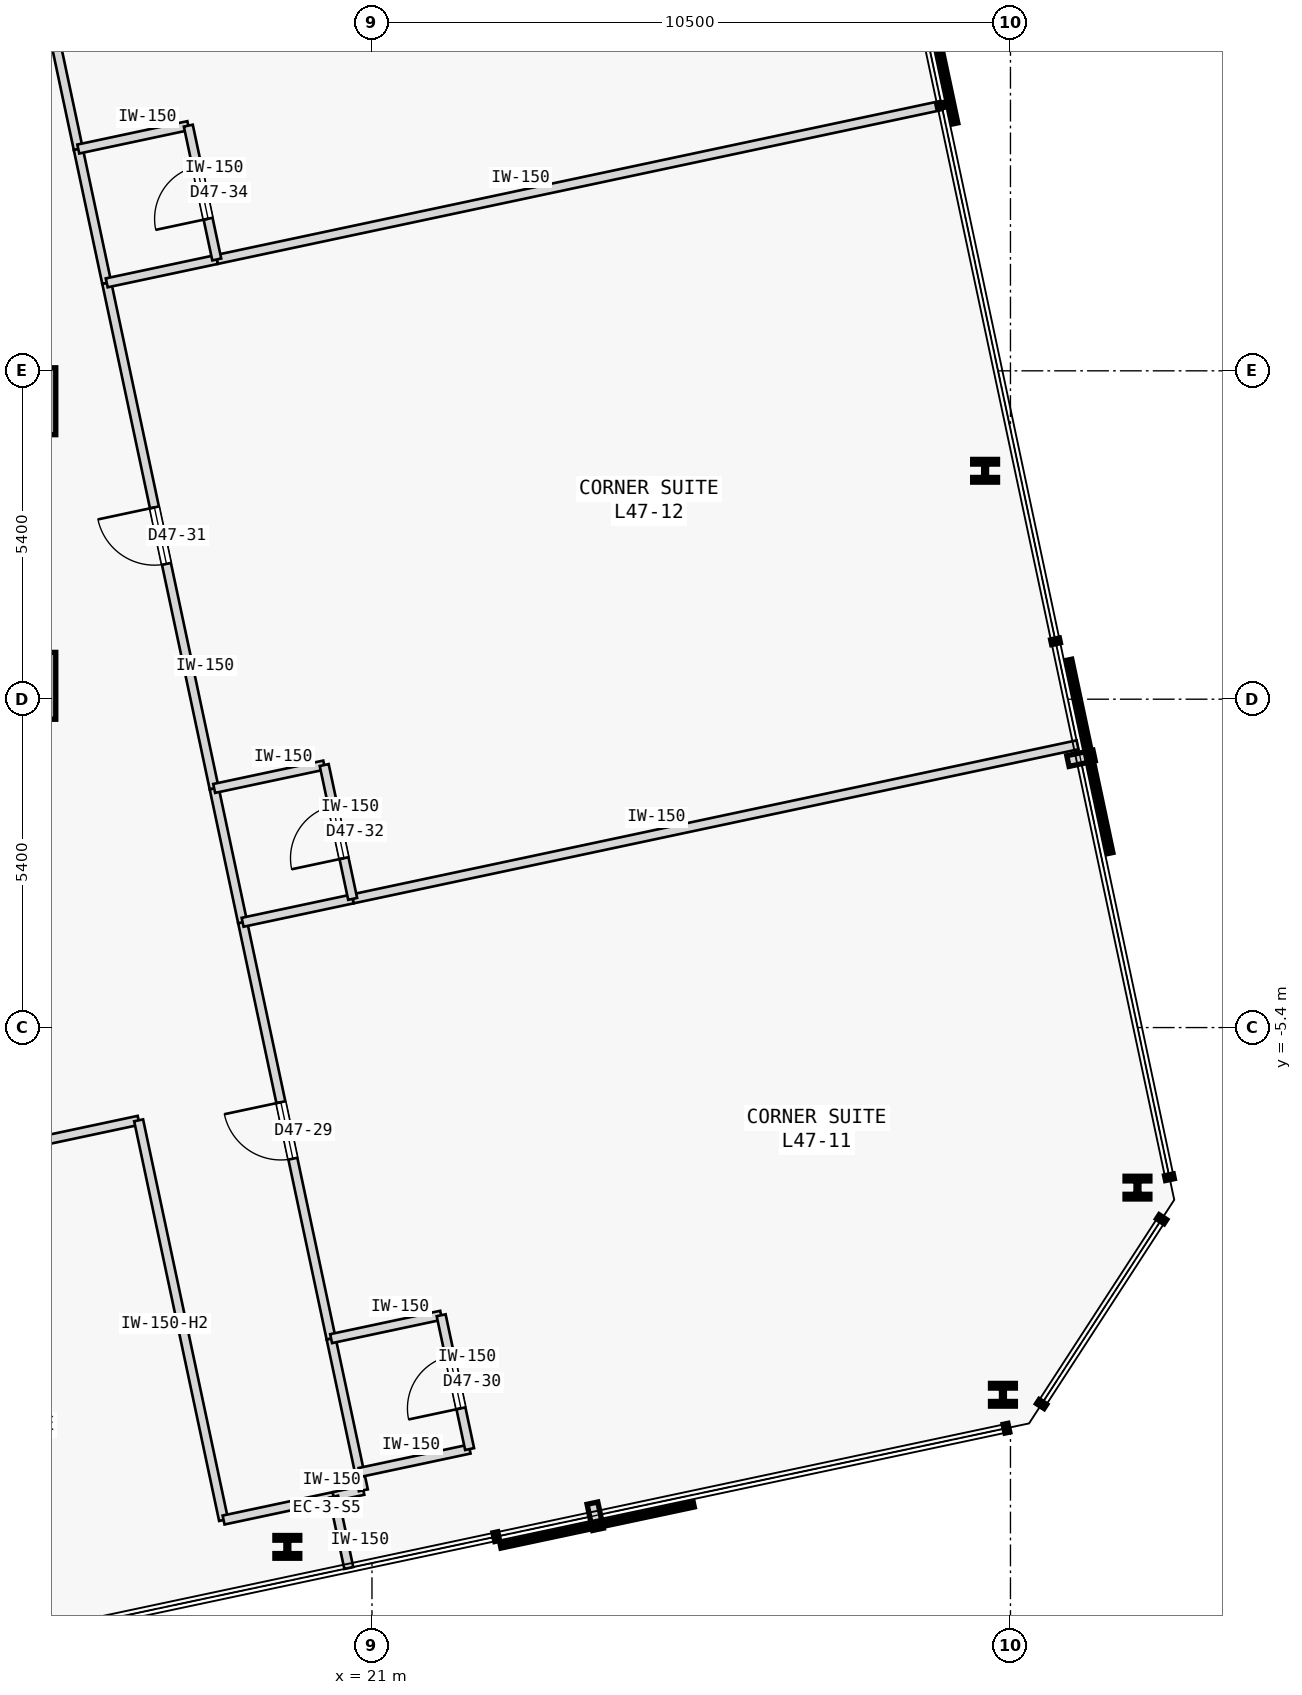
"""IFC4 building model, lengths in metres.
Left out: names, types, materials, properties, quantities, classifications, styles, units other than length and angle.
Written with IfcOpenShell. Run it as: python <this file> out.ifc"""

import sys

from ifc_helpers import new_model, si_unit, direction, frame, frame_2d, origin, origin_2d, place, context, subcontext, project, spatial, rectangle, i_section, extrude, element, fill, save


model = new_model("IFC4")
c1 = context("Model", 3, precision=1e-05, world=origin(), true_north=direction((0.0, 1.0)))
c2 = subcontext(c1, "Body", "Model", "MODEL_VIEW")
j1 = project(units=[si_unit("LENGTHUNIT", "METRE"), si_unit("PLANEANGLEUNIT", "RADIAN")], contexts=[c1])
p1 = place(None, origin())
s1 = spatial("IfcSite", under=j1, at=p1, CompositionType="ELEMENT")
p2 = place(p1, origin())
s2 = spatial("IfcBuilding", under=s1, at=p2, CompositionType="ELEMENT")
p3 = place(p2, frame((0.0, 0.0, 182.0)))
s3 = spatial("IfcBuildingStorey", under=s2, at=p3, CompositionType="ELEMENT", Elevation=182.0)
for number, where, z_axis, x_axis in (
    (1, (15.25, 4.9, 0.0), (0.0, 0.0, 1.0), (1.0, 0.0, 0.0)),
    (2, (15.25, 0.22, 0.0), (0.0, 0.0, 1.0), (1.0, 0.0, 0.0)),
):
    element("IfcColumn", number, at=place(p3, frame(where, z_axis=z_axis, x_axis=x_axis)), inside=s3, PredefinedType="COLUMN", context=c2, shape_type="SweptSolid", body=[
        extrude(rectangle(XDim=1.1, YDim=1.1, at=origin_2d()), origin(), (0.0, 0.0, 1.0), 3.4),
    ])
for number, where, z_axis, x_axis in (
    (3, (19.608, -13.94, 0.0), (0.0, 0.0, 1.0), (1.0, 0.0, 0.0)),
    (4, (31.376, -11.439, 0.0), (0.0, 0.0, 1.0), (1.0, 0.0, 0.0)),
    (5, (33.589, -8.032, 0.0), (0.0, 0.0, 1.0), (1.0, 0.0, 0.0)),
    (6, (31.083, 3.756, 0.0), (0.0, 0.0, 1.0), (1.0, 0.0, 0.0)),
):
    element("IfcColumn", number, at=place(p3, frame(where, z_axis=z_axis, x_axis=x_axis)), inside=s3, PredefinedType="COLUMN", context=c2, shape_type="SweptSolid", body=[
        extrude(i_section(OverallWidth=0.409, OverallDepth=0.374, WebThickness=0.048, FlangeThickness=0.077, FilletRadius=0.015, at=origin_2d()), origin(), (0.0, 0.0, 1.0), 3.4),
    ])
p4 = place(p3, frame((8.964, -8.668, 0.0), z_axis=(0.0, 0.0, 1.0), x_axis=(0.978149300771, 0.20790369261, 0.0)))
e7 = element("IfcWall", 7, at=p4, inside=s3, PredefinedType="PARTITIONING", context=c2, shape_type="SweptSolid", body=[
    extrude(rectangle(XDim=8.382, YDim=0.15, at=frame_2d((4.191, 0.0))), origin(), (0.0, 0.0, 1.0), 3.175),
])
p5 = place(p4, frame((3.731, 0.0, 0.0)))
e8 = element("IfcOpeningElement", 8, at=p5, cuts=e7, PredefinedType="OPENING", context=c2, shape_type="SweptSolid", body=[
    extrude(rectangle(XDim=0.92, YDim=2.15, at=frame_2d((0.46, 1.075))), frame((0.0, 0.085, 0.0), z_axis=(0.0, -1.0, 0.0), x_axis=(1.0, 0.0, 0.0)), (0.0, 0.0, 1.0), 0.17),
])
p6 = place(p3, frame((18.56, -13.498, 0.0), z_axis=(0.0, 0.0, 1.0), x_axis=(-0.207888737749, 0.978152479278, 0.0)))
e9 = element("IfcWall", 9, at=p6, inside=s3, PredefinedType="PARTITIONING", context=c2, shape_type="SweptSolid", body=[
    extrude(rectangle(XDim=6.72, YDim=0.15, at=frame_2d((3.36, 0.0))), origin(), (0.0, 0.0, 1.0), 2.575),
])
p7 = place(p3, frame((18.56, -13.498, 0.0), z_axis=(0.0, 0.0, 1.0), x_axis=(0.978160192495, 0.207852442415, 0.0)))
e10 = element("IfcWall", 10, at=p7, inside=s3, PredefinedType="PARTITIONING", context=c2, shape_type="SweptSolid", body=[
    extrude(rectangle(XDim=1.85, YDim=0.15, at=frame_2d((0.925, 0.0))), origin(), (0.0, 0.0, 1.0), 3.175),
])
p8 = place(p3, frame((20.369, -13.114, 0.0), z_axis=(0.0, 0.0, 1.0), x_axis=(0.978143962546, 0.207928806409, 0.0)))
e11 = element("IfcWall", 11, at=p8, inside=s3, PredefinedType="PARTITIONING", context=c2, shape_type="SweptSolid", body=[
    extrude(rectangle(XDim=0.5, YDim=0.15, at=frame_2d((0.25, 0.0))), origin(), (0.0, 0.0, 1.0), 3.175),
])
p9 = place(p3, frame((20.858, -13.01, 0.0), z_axis=(0.0, 0.0, 1.0), x_axis=(-0.208306395052, 0.978063620518, 0.0)))
e12 = element("IfcWall", 12, at=p9, inside=s3, PredefinedType="PARTITIONING", context=c2, shape_type="SweptSolid", body=[
    extrude(rectangle(XDim=0.3, YDim=0.15, at=frame_2d((0.15, 0.0))), origin(), (0.0, 0.0, 1.0), 3.175),
])
p10 = place(p3, frame((20.328, -10.515, 0.0), z_axis=(0.0, 0.0, 1.0), x_axis=(-0.207906726269, 0.978148655968, 0.0)))
e13 = element("IfcWall", 13, at=p10, inside=s3, PredefinedType="PARTITIONING", context=c2, shape_type="SweptSolid", body=[
    extrude(rectangle(XDim=7.0, YDim=0.15, at=frame_2d((3.5, 0.0))), origin(), (0.0, 0.0, 1.0), 3.175),
])
p11 = place(p10, frame((3.025, 0.0, 0.0)))
e14 = element("IfcOpeningElement", 14, at=p11, cuts=e13, PredefinedType="OPENING", context=c2, shape_type="SweptSolid", body=[
    extrude(rectangle(XDim=0.95, YDim=2.15, at=frame_2d((0.475, 1.075))), frame((0.0, 0.085, 0.0), z_axis=(0.0, -1.0, 0.0), x_axis=(1.0, 0.0, 0.0)), (0.0, 0.0, 1.0), 0.17),
])
p12 = place(p3, frame((20.796, -12.716, 0.0), z_axis=(0.0, 0.0, 1.0), x_axis=(-0.207891197838, 0.978151956427, 0.0)))
e15 = element("IfcWall", 15, at=p12, inside=s3, PredefinedType="PARTITIONING", context=c2, shape_type="SweptSolid", body=[
    extrude(rectangle(XDim=2.25, YDim=0.15, at=frame_2d((1.125, 0.0))), origin(), (0.0, 0.0, 1.0), 3.175),
])
p13 = place(p3, frame((18.405, -1.468, 0.0), z_axis=(0.0, 0.0, 1.0), x_axis=(-0.207888984761, 0.97815242678, 0.0)))
e16 = element("IfcWall", 16, at=p13, inside=s3, PredefinedType="PARTITIONING", context=c2, shape_type="SweptSolid", body=[
    extrude(rectangle(XDim=8.5, YDim=0.15, at=frame_2d((4.25, 0.0))), origin(), (0.0, 0.0, 1.0), 3.175),
])
p14 = place(p13, frame((3.775, 0.0, 0.0)))
e17 = element("IfcOpeningElement", 17, at=p14, cuts=e16, PredefinedType="OPENING", context=c2, shape_type="SweptSolid", body=[
    extrude(rectangle(XDim=0.95, YDim=2.15, at=frame_2d((0.475, 1.075))), frame((0.0, 0.085, 0.0), z_axis=(0.0, -1.0, 0.0), x_axis=(1.0, 0.0, 0.0)), (0.0, 0.0, 1.0), 0.17),
])
p15 = place(p3, frame((18.873, -3.668, 0.0), z_axis=(0.0, 0.0, 1.0), x_axis=(-0.208017083936, 0.9781251928, 0.0)))
e18 = element("IfcWall", 18, at=p15, inside=s3, PredefinedType="PARTITIONING", context=c2, shape_type="SweptSolid", body=[
    extrude(rectangle(XDim=2.25, YDim=0.15, at=frame_2d((1.125, 0.0))), origin(), (0.0, 0.0, 1.0), 3.175),
])
p16 = place(p3, frame((16.17, 9.047, 0.0), z_axis=(0.0, 0.0, 1.0), x_axis=(-0.2079164651, 0.978146585917, 0.0)))
e19 = element("IfcWall", 19, at=p16, inside=s3, PredefinedType="PARTITIONING", context=c2, shape_type="SweptSolid", body=[
    extrude(rectangle(XDim=8.5, YDim=0.15, at=frame_2d((4.25, 0.0))), origin(), (0.0, 0.0, 1.0), 3.175),
])
p17 = place(p16, frame((3.775, 0.0, 0.0)))
e20 = element("IfcOpeningElement", 20, at=p17, cuts=e19, PredefinedType="OPENING", context=c2, shape_type="SweptSolid", body=[
    extrude(rectangle(XDim=0.95, YDim=2.15, at=frame_2d((0.475, 1.075))), frame((0.0, 0.085, 0.0), z_axis=(0.0, -1.0, 0.0), x_axis=(1.0, 0.0, 0.0)), (0.0, 0.0, 1.0), 0.17),
])
p18 = place(p3, frame((16.638, 6.847, 0.0), z_axis=(0.0, 0.0, 1.0), x_axis=(-0.207913264065, 0.978147266328, 0.0)))
e21 = element("IfcWall", 21, at=p18, inside=s3, PredefinedType="PARTITIONING", context=c2, shape_type="SweptSolid", body=[
    extrude(rectangle(XDim=2.25, YDim=0.15, at=frame_2d((1.125, 0.0))), origin(), (0.0, 0.0, 1.0), 3.175),
])
p19 = place(p3, frame((20.619, -14.288, 0.0), z_axis=(0.0, 0.0, 1.0), x_axis=(-0.207917150959, 0.978146440129, 0.0)))
e22 = element("IfcWall", 22, at=p19, inside=s3, PredefinedType="PARTITIONING", context=c2, shape_type="SweptSolid", body=[
    extrude(rectangle(XDim=1.2, YDim=0.15, at=frame_2d((0.6, 0.0))), origin(), (0.0, 0.0, 1.0), 3.175),
])
for number, where, z_axis, x_axis in (
    (23, (20.796, -12.716, 0.0), (0.0, 0.0, 1.0), (0.978, 0.208, 0.0)),
    (24, (20.328, -10.515, 0.0), (0.0, 0.0, 1.0), (0.978, 0.208, 0.0)),
):
    element("IfcWall", number, at=place(p3, frame(where, z_axis=z_axis, x_axis=x_axis)), inside=s3, PredefinedType="PARTITIONING", context=c2, shape_type="SweptSolid", body=[
        extrude(rectangle(XDim=1.85, YDim=0.15, at=frame_2d((0.925, 0.0))), origin(), (0.0, 0.0, 1.0), 3.175),
    ])
p20 = place(p3, frame((22.605, -12.332, 0.0), z_axis=(0.0, 0.0, 1.0), x_axis=(-0.207891197838, 0.978151956427, 0.0)))
e25 = element("IfcWall", 25, at=p20, inside=s3, PredefinedType="PARTITIONING", context=c2, shape_type="SweptSolid", body=[
    extrude(rectangle(XDim=2.25, YDim=0.15, at=frame_2d((1.125, 0.0))), origin(), (0.0, 0.0, 1.0), 3.175),
])
p21 = place(p20, frame((0.685, 0.0, 0.0)))
e26 = element("IfcOpeningElement", 26, at=p21, cuts=e25, PredefinedType="OPENING", context=c2, shape_type="SweptSolid", body=[
    extrude(rectangle(XDim=0.88, YDim=2.15, at=frame_2d((0.44, 1.075))), frame((0.0, 0.085, 0.0), z_axis=(0.0, -1.0, 0.0), x_axis=(1.0, 0.0, 0.0)), (0.0, 0.0, 1.0), 0.17),
])
p22 = place(p3, frame((20.682, -3.284, 0.0), z_axis=(0.0, 0.0, 1.0), x_axis=(0.97814556055, 0.207921288896, 0.0)))
e27 = element("IfcWall", 27, at=p22, inside=s3, PredefinedType="PARTITIONING", context=c2, shape_type="SweptSolid", body=[
    extrude(rectangle(XDim=12.187, YDim=0.15, at=frame_2d((6.094, 0.0))), origin(), (0.0, 0.0, 1.0), 3.175),
])
p23 = place(p3, frame((18.873, -3.668, 0.0), z_axis=(0.0, 0.0, 1.0), x_axis=(0.978160192495, 0.207852442415, 0.0)))
e28 = element("IfcWall", 28, at=p23, inside=s3, PredefinedType="PARTITIONING", context=c2, shape_type="SweptSolid", body=[
    extrude(rectangle(XDim=1.85, YDim=0.15, at=frame_2d((0.925, 0.0))), origin(), (0.0, 0.0, 1.0), 3.175),
])
p24 = place(p3, frame((18.405, -1.468, 0.0), z_axis=(0.0, 0.0, 1.0), x_axis=(0.978139061018, 0.207951862966, 0.0)))
e29 = element("IfcWall", 29, at=p24, inside=s3, PredefinedType="PARTITIONING", context=c2, shape_type="SweptSolid", body=[
    extrude(rectangle(XDim=1.85, YDim=0.15, at=frame_2d((0.925, 0.0))), origin(), (0.0, 0.0, 1.0), 3.175),
])
p25 = place(p3, frame((20.682, -3.284, 0.0), z_axis=(0.0, 0.0, 1.0), x_axis=(-0.207891197838, 0.978151956427, 0.0)))
e30 = element("IfcWall", 30, at=p25, inside=s3, PredefinedType="PARTITIONING", context=c2, shape_type="SweptSolid", body=[
    extrude(rectangle(XDim=2.25, YDim=0.15, at=frame_2d((1.125, 0.0))), origin(), (0.0, 0.0, 1.0), 3.175),
])
p26 = place(p25, frame((0.685, 0.0, 0.0)))
e31 = element("IfcOpeningElement", 31, at=p26, cuts=e30, PredefinedType="OPENING", context=c2, shape_type="SweptSolid", body=[
    extrude(rectangle(XDim=0.88, YDim=2.15, at=frame_2d((0.44, 1.075))), frame((0.0, 0.085, 0.0), z_axis=(0.0, -1.0, 0.0), x_axis=(1.0, 0.0, 0.0)), (0.0, 0.0, 1.0), 0.17),
])
p27 = place(p3, frame((18.447, 7.231, 0.0), z_axis=(0.0, 0.0, 1.0), x_axis=(0.978149634612, 0.207902121941, 0.0)))
e32 = element("IfcWall", 32, at=p27, inside=s3, PredefinedType="PARTITIONING", context=c2, shape_type="SweptSolid", body=[
    extrude(rectangle(XDim=12.187, YDim=0.15, at=frame_2d((6.094, 0.0))), origin(), (0.0, 0.0, 1.0), 3.175),
])
p28 = place(p3, frame((16.638, 6.847, 0.0), z_axis=(0.0, 0.0, 1.0), x_axis=(0.978160192495, 0.207852442415, 0.0)))
e33 = element("IfcWall", 33, at=p28, inside=s3, PredefinedType="PARTITIONING", context=c2, shape_type="SweptSolid", body=[
    extrude(rectangle(XDim=1.85, YDim=0.15, at=frame_2d((0.925, 0.0))), origin(), (0.0, 0.0, 1.0), 3.175),
])
p29 = place(p3, frame((16.17, 9.047, 0.0), z_axis=(0.0, 0.0, 1.0), x_axis=(0.978133353907, 0.20797870558, 0.0)))
e34 = element("IfcWall", 34, at=p29, inside=s3, PredefinedType="PARTITIONING", context=c2, shape_type="SweptSolid", body=[
    extrude(rectangle(XDim=1.85, YDim=0.15, at=frame_2d((0.925, 0.0))), origin(), (0.0, 0.0, 1.0), 3.175),
])
p30 = place(p3, frame((18.447, 7.231, 0.0), z_axis=(0.0, 0.0, 1.0), x_axis=(-0.207891197838, 0.978151956427, 0.0)))
e35 = element("IfcWall", 35, at=p30, inside=s3, PredefinedType="PARTITIONING", context=c2, shape_type="SweptSolid", body=[
    extrude(rectangle(XDim=2.25, YDim=0.15, at=frame_2d((1.125, 0.0))), origin(), (0.0, 0.0, 1.0), 3.175),
])
p31 = place(p30, frame((0.685, 0.0, 0.0)))
e36 = element("IfcOpeningElement", 36, at=p31, cuts=e35, PredefinedType="OPENING", context=c2, shape_type="SweptSolid", body=[
    extrude(rectangle(XDim=0.88, YDim=2.15, at=frame_2d((0.44, 1.075))), frame((0.0, 0.085, 0.0), z_axis=(0.0, -1.0, 0.0), x_axis=(1.0, 0.0, 0.0)), (0.0, 0.0, 1.0), 0.17),
])
p32 = place(p11, origin())
e37 = element("IfcDoor", 37, at=p32, inside=s3, OperationType="SINGLE_SWING_RIGHT", PredefinedType="DOOR", context=c2, shape_type="SweptSolid", body=[
    extrude(rectangle(XDim=0.95, YDim=2.15, at=frame_2d((0.475, 1.075))), frame((0.0, 0.025, 0.0), z_axis=(0.0, -1.0, 0.0), x_axis=(1.0, 0.0, 0.0)), (0.0, 0.0, 1.0), 0.05),
])
fill(e14, e37)
p33 = place(p21, origin())
e38 = element("IfcDoor", 38, at=p33, inside=s3, OperationType="SINGLE_SWING_LEFT", PredefinedType="DOOR", context=c2, shape_type="SweptSolid", body=[
    extrude(rectangle(XDim=0.88, YDim=2.15, at=frame_2d((0.44, 1.075))), frame((0.0, 0.025, 0.0), z_axis=(0.0, -1.0, 0.0), x_axis=(1.0, 0.0, 0.0)), (0.0, 0.0, 1.0), 0.05),
])
fill(e26, e38)
p34 = place(p14, origin())
e39 = element("IfcDoor", 39, at=p34, inside=s3, OperationType="SINGLE_SWING_RIGHT", PredefinedType="DOOR", context=c2, shape_type="SweptSolid", body=[
    extrude(rectangle(XDim=0.95, YDim=2.15, at=frame_2d((0.475, 1.075))), frame((0.0, 0.025, 0.0), z_axis=(0.0, -1.0, 0.0), x_axis=(1.0, 0.0, 0.0)), (0.0, 0.0, 1.0), 0.05),
])
fill(e17, e39)
p35 = place(p26, origin())
e40 = element("IfcDoor", 40, at=p35, inside=s3, OperationType="SINGLE_SWING_LEFT", PredefinedType="DOOR", context=c2, shape_type="SweptSolid", body=[
    extrude(rectangle(XDim=0.88, YDim=2.15, at=frame_2d((0.44, 1.075))), frame((0.0, 0.025, 0.0), z_axis=(0.0, -1.0, 0.0), x_axis=(1.0, 0.0, 0.0)), (0.0, 0.0, 1.0), 0.05),
])
fill(e31, e40)
p36 = place(p31, origin())
e41 = element("IfcDoor", 41, at=p36, inside=s3, OperationType="SINGLE_SWING_LEFT", PredefinedType="DOOR", context=c2, shape_type="SweptSolid", body=[
    extrude(rectangle(XDim=0.88, YDim=2.15, at=frame_2d((0.44, 1.075))), frame((0.0, 0.025, 0.0), z_axis=(0.0, -1.0, 0.0), x_axis=(1.0, 0.0, 0.0)), (0.0, 0.0, 1.0), 0.05),
])
fill(e36, e41)
save(model, sys.argv[1])
